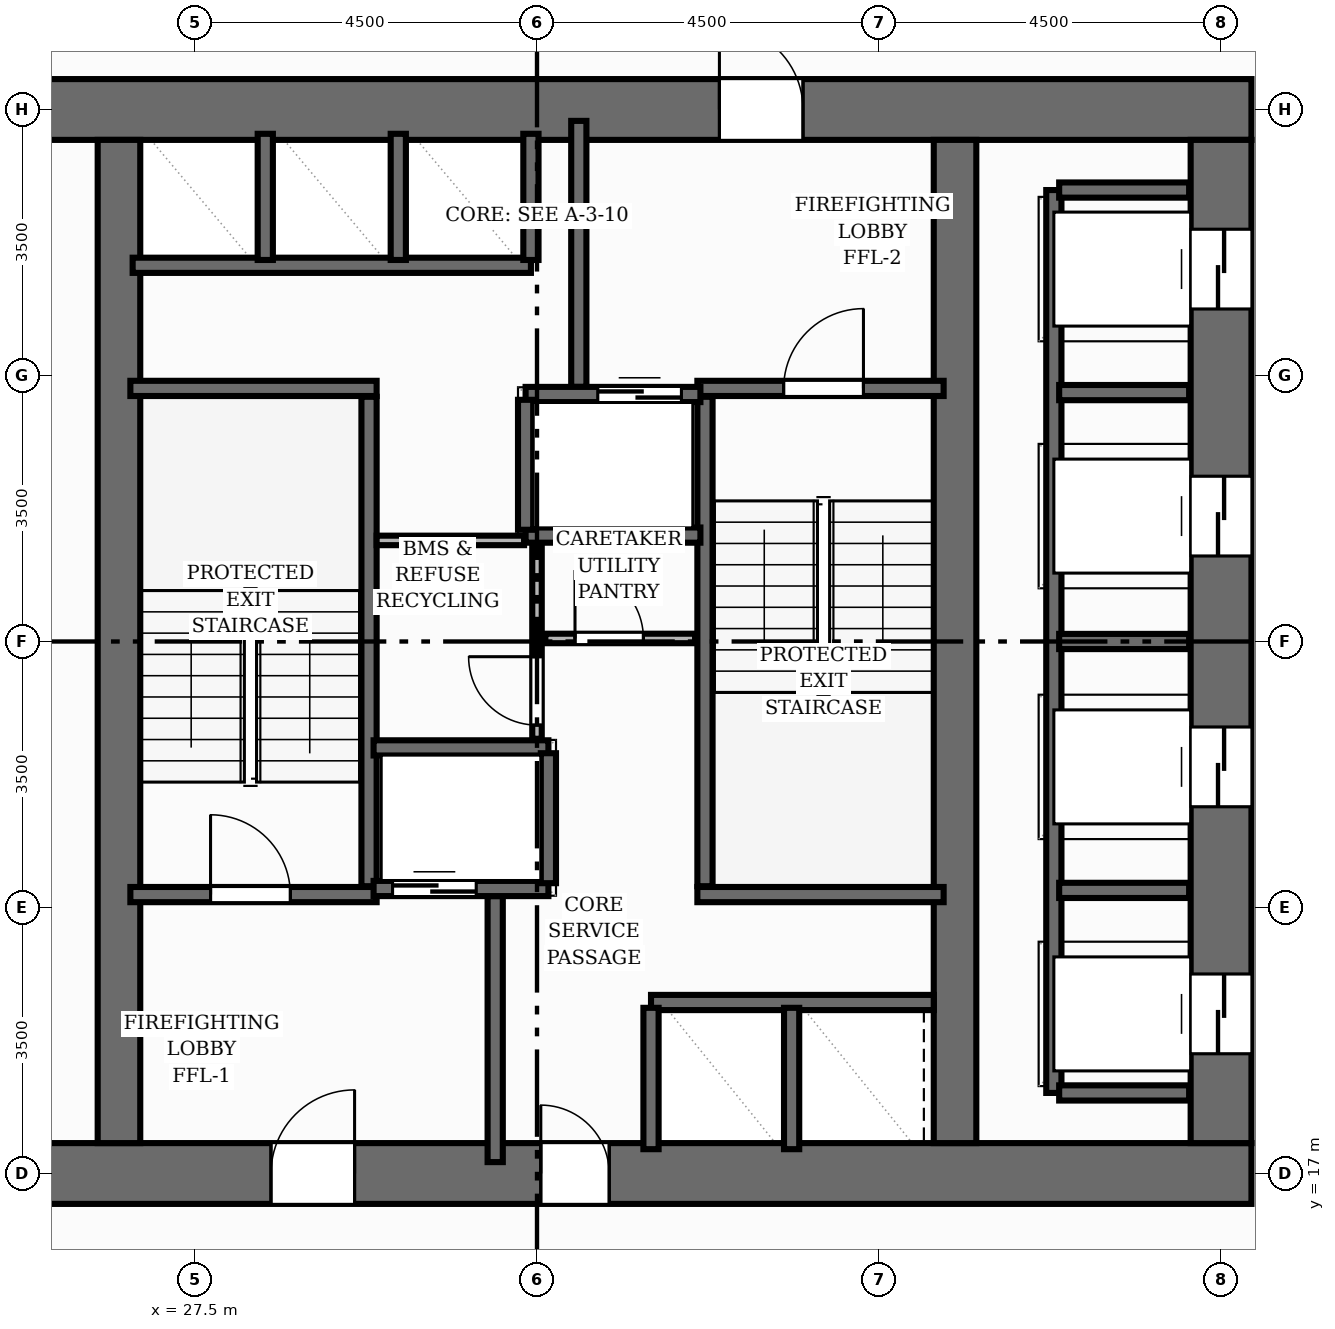
"""IFC4 building model, lengths in metres.
Left out: names, types, materials, properties, quantities, classifications, styles, units other than length and angle.
Written with IfcOpenShell. Run it as: python <this file> out.ifc"""

import sys

from ifc_helpers import new_model, si_unit, direction, frame, frame_2d, origin, place, context, subcontext, project, spatial, rectangle, extrude, element, fill, save


model = new_model("IFC4")
c1 = context("Model", 3, precision=1e-05, world=origin(), true_north=direction((0.0, 1.0)))
c2 = subcontext(c1, "Body", "Model", "MODEL_VIEW")
j1 = project(units=[si_unit("LENGTHUNIT", "METRE"), si_unit("PLANEANGLEUNIT", "RADIAN")], contexts=[c1])
p1 = place(None, origin())
s1 = spatial("IfcSite", under=j1, at=p1, CompositionType="ELEMENT")
p2 = place(p1, origin())
s2 = spatial("IfcBuilding", under=s1, at=p2, CompositionType="ELEMENT")
p3 = place(p2, frame((0.0, 0.0, 40.8)))
s3 = spatial("IfcBuildingStorey", under=s2, at=p3, CompositionType="ELEMENT", Elevation=40.8)
p4 = place(p3, frame((22.6, 17.0, 0.0), z_axis=(0.0, 0.0, 1.0), x_axis=(1.0, 0.0, 0.0)))
e1 = element("IfcWall", 1, at=p4, inside=s3, PredefinedType="SHEAR", context=c2, shape_type="SweptSolid", body=[
    extrude(rectangle(XDim=18.8, YDim=0.8, at=frame_2d((9.4, 0.0))), origin(), (0.0, 0.0, 1.0), 3.2),
])
p5 = place(p4, frame((5.9, 0.0, 0.0)))
e2 = element("IfcOpeningElement", 2, at=p5, cuts=e1, PredefinedType="OPENING", context=c2, shape_type="SweptSolid", body=[
    extrude(rectangle(XDim=1.1, YDim=2.15, at=frame_2d((0.55, 1.075))), frame((0.0, 0.41, 0.0), z_axis=(0.0, -1.0, 0.0), x_axis=(1.0, 0.0, 0.0)), (0.0, 0.0, 1.0), 0.82),
])
p6 = place(p4, frame((9.45, 0.0, 0.0)))
e3 = element("IfcOpeningElement", 3, at=p6, cuts=e1, PredefinedType="OPENING", context=c2, shape_type="SweptSolid", body=[
    extrude(rectangle(XDim=0.9, YDim=2.1, at=frame_2d((0.45, 1.05))), frame((0.0, 0.41, 0.0), z_axis=(0.0, -1.0, 0.0), x_axis=(1.0, 0.0, 0.0)), (0.0, 0.0, 1.0), 0.82),
])
p7 = place(p3, frame((22.6, 31.0, 0.0), z_axis=(0.0, 0.0, 1.0), x_axis=(1.0, 0.0, 0.0)))
e4 = element("IfcWall", 4, at=p7, inside=s3, PredefinedType="SHEAR", context=c2, shape_type="SweptSolid", body=[
    extrude(rectangle(XDim=18.8, YDim=0.8, at=frame_2d((9.4, 0.0))), origin(), (0.0, 0.0, 1.0), 3.2),
])
p8 = place(p7, frame((11.8, 0.0, 0.0)))
e5 = element("IfcOpeningElement", 5, at=p8, cuts=e4, PredefinedType="OPENING", context=c2, shape_type="SweptSolid", body=[
    extrude(rectangle(XDim=1.1, YDim=2.15, at=frame_2d((0.55, 1.075))), frame((0.0, 0.41, 0.0), z_axis=(0.0, -1.0, 0.0), x_axis=(1.0, 0.0, 0.0)), (0.0, 0.0, 1.0), 0.82),
])
p9 = place(p3, frame((41.0, 17.4, 0.0), z_axis=(0.0, 0.0, 1.0), x_axis=(0.0, 1.0, 0.0)))
e6 = element("IfcWall", 6, at=p9, inside=s3, PredefinedType="SHEAR", context=c2, shape_type="SweptSolid", body=[
    extrude(rectangle(XDim=13.2, YDim=0.8, at=frame_2d((6.6, 0.0))), origin(), (0.0, 0.0, 1.0), 3.2),
])
p10 = place(p9, frame((1.175, 0.0, 0.0)))
e7 = element("IfcOpeningElement", 7, at=p10, cuts=e6, PredefinedType="OPENING", context=c2, shape_type="SweptSolid", body=[
    extrude(rectangle(XDim=1.05, YDim=2.15, at=frame_2d((0.525, 1.075))), frame((0.0, 0.41, 0.0), z_axis=(0.0, -1.0, 0.0), x_axis=(1.0, 0.0, 0.0)), (0.0, 0.0, 1.0), 0.82),
])
p11 = place(p9, frame((4.425, 0.0, 0.0)))
e8 = element("IfcOpeningElement", 8, at=p11, cuts=e6, PredefinedType="OPENING", context=c2, shape_type="SweptSolid", body=[
    extrude(rectangle(XDim=1.05, YDim=2.15, at=frame_2d((0.525, 1.075))), frame((0.0, 0.41, 0.0), z_axis=(0.0, -1.0, 0.0), x_axis=(1.0, 0.0, 0.0)), (0.0, 0.0, 1.0), 0.82),
])
p12 = place(p9, frame((7.725, 0.0, 0.0)))
e9 = element("IfcOpeningElement", 9, at=p12, cuts=e6, PredefinedType="OPENING", context=c2, shape_type="SweptSolid", body=[
    extrude(rectangle(XDim=1.05, YDim=2.15, at=frame_2d((0.525, 1.075))), frame((0.0, 0.41, 0.0), z_axis=(0.0, -1.0, 0.0), x_axis=(1.0, 0.0, 0.0)), (0.0, 0.0, 1.0), 0.82),
])
p13 = place(p9, frame((10.975, 0.0, 0.0)))
e10 = element("IfcOpeningElement", 10, at=p13, cuts=e6, PredefinedType="OPENING", context=c2, shape_type="SweptSolid", body=[
    extrude(rectangle(XDim=1.05, YDim=2.15, at=frame_2d((0.525, 1.075))), frame((0.0, 0.41, 0.0), z_axis=(0.0, -1.0, 0.0), x_axis=(1.0, 0.0, 0.0)), (0.0, 0.0, 1.0), 0.82),
])
for number, where, z_axis, x_axis in (
    (11, (26.5, 17.4, 0.0), (0.0, 0.0, 1.0), (0.0, 1.0, 0.0)),
    (12, (37.5, 17.4, 0.0), (0.0, 0.0, 1.0), (0.0, 1.0, 0.0)),
):
    element("IfcWall", number, at=place(p3, frame(where, z_axis=z_axis, x_axis=x_axis)), inside=s3, PredefinedType="SHEAR", context=c2, shape_type="SweptSolid", body=[
        extrude(rectangle(XDim=13.2, YDim=0.56, at=frame_2d((6.6, 0.0))), origin(), (0.0, 0.0, 1.0), 3.2),
    ])
p14 = place(p3, frame((29.79, 20.78, 0.0), z_axis=(0.0, 0.0, 1.0), x_axis=(0.0, 1.0, 0.0)))
e13 = element("IfcWall", 13, at=p14, inside=s3, PredefinedType="SHEAR", context=c2, shape_type="SweptSolid", body=[
    extrude(rectangle(XDim=6.44, YDim=0.2, at=frame_2d((3.22, 0.0))), origin(), (0.0, 0.0, 1.0), 3.2),
])
p15 = place(p3, frame((26.65, 27.33, 0.0), z_axis=(0.0, 0.0, 1.0), x_axis=(1.0, 0.0, 0.0)))
e14 = element("IfcWall", 14, at=p15, inside=s3, PredefinedType="SHEAR", context=c2, shape_type="SweptSolid", body=[
    extrude(rectangle(XDim=3.24, YDim=0.2, at=frame_2d((1.62, 0.0))), origin(), (0.0, 0.0, 1.0), 3.2),
])
p16 = place(p3, frame((26.65, 20.67, 0.0), z_axis=(0.0, 0.0, 1.0), x_axis=(1.0, 0.0, 0.0)))
e15 = element("IfcWall", 15, at=p16, inside=s3, PredefinedType="SHEAR", context=c2, shape_type="SweptSolid", body=[
    extrude(rectangle(XDim=3.24, YDim=0.2, at=frame_2d((1.62, 0.0))), origin(), (0.0, 0.0, 1.0), 3.2),
])
p17 = place(p16, frame((1.055, 0.0, 0.0)))
e16 = element("IfcOpeningElement", 16, at=p17, cuts=e15, PredefinedType="OPENING", context=c2, shape_type="SweptSolid", body=[
    extrude(rectangle(XDim=1.05, YDim=2.15, at=frame_2d((0.525, 1.075))), frame((0.0, 0.11, 0.0), z_axis=(0.0, -1.0, 0.0), x_axis=(1.0, 0.0, 0.0)), (0.0, 0.0, 1.0), 0.22),
])
p18 = place(p3, frame((34.21, 20.78, 0.0), z_axis=(0.0, 0.0, 1.0), x_axis=(0.0, 1.0, 0.0)))
e17 = element("IfcWall", 17, at=p18, inside=s3, PredefinedType="SHEAR", context=c2, shape_type="SweptSolid", body=[
    extrude(rectangle(XDim=6.44, YDim=0.2, at=frame_2d((3.22, 0.0))), origin(), (0.0, 0.0, 1.0), 3.2),
])
p19 = place(p3, frame((34.11, 20.67, 0.0), z_axis=(0.0, 0.0, 1.0), x_axis=(1.0, 0.0, 0.0)))
e18 = element("IfcWall", 18, at=p19, inside=s3, PredefinedType="SHEAR", context=c2, shape_type="SweptSolid", body=[
    extrude(rectangle(XDim=3.24, YDim=0.2, at=frame_2d((1.62, 0.0))), origin(), (0.0, 0.0, 1.0), 3.2),
])
p20 = place(p3, frame((34.11, 27.33, 0.0), z_axis=(0.0, 0.0, 1.0), x_axis=(1.0, 0.0, 0.0)))
e19 = element("IfcWall", 19, at=p20, inside=s3, PredefinedType="SHEAR", context=c2, shape_type="SweptSolid", body=[
    extrude(rectangle(XDim=3.24, YDim=0.2, at=frame_2d((1.62, 0.0))), origin(), (0.0, 0.0, 1.0), 3.2),
])
p21 = place(p20, frame((1.135, 0.0, 0.0)))
e20 = element("IfcOpeningElement", 20, at=p21, cuts=e19, PredefinedType="OPENING", context=c2, shape_type="SweptSolid", body=[
    extrude(rectangle(XDim=1.05, YDim=2.15, at=frame_2d((0.525, 1.075))), frame((0.0, 0.11, 0.0), z_axis=(0.0, -1.0, 0.0), x_axis=(1.0, 0.0, 0.0)), (0.0, 0.0, 1.0), 0.22),
])
for number, where, z_axis, x_axis in (
    (21, (31.45, 17.15, 0.0), (0.0, 0.0, 1.0), (0.0, 1.0, 0.0)),
    (22, (32.55, 27.35, 0.0), (0.0, 0.0, 1.0), (0.0, 1.0, 0.0)),
):
    element("IfcWall", number, at=place(p3, frame(where, z_axis=z_axis, x_axis=x_axis)), inside=s3, PredefinedType="SHEAR", context=c2, shape_type="SweptSolid", body=[
        extrude(rectangle(XDim=3.5, YDim=0.2, at=frame_2d((1.75, 0.0))), origin(), (0.0, 0.0, 1.0), 3.2),
    ])
p22 = place(p3, frame((29.85, 20.75, 0.0), z_axis=(0.0, 0.0, 1.0), x_axis=(1.0, 0.0, 0.0)))
e23 = element("IfcWall", 23, at=p22, inside=s3, PredefinedType="SHEAR", context=c2, shape_type="SweptSolid", body=[
    extrude(rectangle(XDim=2.3, YDim=0.2, at=frame_2d((1.15, 0.0))), origin(), (0.0, 0.0, 1.0), 3.2),
])
p23 = place(p22, frame((0.25, 0.0, 0.0)))
e24 = element("IfcOpeningElement", 24, at=p23, cuts=e23, PredefinedType="OPENING", context=c2, shape_type="SweptSolid", body=[
    extrude(rectangle(XDim=1.1, YDim=2.15, at=frame_2d((0.55, 1.075))), frame((0.0, 0.11, 0.0), z_axis=(0.0, -1.0, 0.0), x_axis=(1.0, 0.0, 0.0)), (0.0, 0.0, 1.0), 0.22),
])
p24 = place(p3, frame((29.85, 22.6, 0.0), z_axis=(0.0, 0.0, 1.0), x_axis=(1.0, 0.0, 0.0)))
e25 = element("IfcWall", 25, at=p24, inside=s3, PredefinedType="SHEAR", context=c2, shape_type="SweptSolid", body=[
    extrude(rectangle(XDim=2.3, YDim=0.2, at=frame_2d((1.15, 0.0))), origin(), (0.0, 0.0, 1.0), 3.2),
])
p25 = place(p3, frame((32.15, 20.82, 0.0), z_axis=(0.0, 0.0, 1.0), x_axis=(0.0, 1.0, 0.0)))
e26 = element("IfcWall", 26, at=p25, inside=s3, PredefinedType="SHEAR", context=c2, shape_type="SweptSolid", body=[
    extrude(rectangle(XDim=1.71, YDim=0.2, at=frame_2d((0.855, 0.0))), origin(), (0.0, 0.0, 1.0), 3.2),
])
p26 = place(p3, frame((31.85, 27.25, 0.0), z_axis=(0.0, 0.0, 1.0), x_axis=(1.0, 0.0, 0.0)))
e27 = element("IfcWall", 27, at=p26, inside=s3, PredefinedType="SHEAR", context=c2, shape_type="SweptSolid", body=[
    extrude(rectangle(XDim=2.3, YDim=0.2, at=frame_2d((1.15, 0.0))), origin(), (0.0, 0.0, 1.0), 3.2),
])
p27 = place(p26, frame((0.95, 0.0, 0.0)))
e28 = element("IfcOpeningElement", 28, at=p27, cuts=e27, PredefinedType="OPENING", context=c2, shape_type="SweptSolid", body=[
    extrude(rectangle(XDim=1.1, YDim=2.15, at=frame_2d((0.55, 1.075))), frame((0.0, 0.11, 0.0), z_axis=(0.0, -1.0, 0.0), x_axis=(1.0, 0.0, 0.0)), (0.0, 0.0, 1.0), 0.22),
])
p28 = place(p3, frame((31.85, 25.4, 0.0), z_axis=(0.0, 0.0, 1.0), x_axis=(1.0, 0.0, 0.0)))
e29 = element("IfcWall", 29, at=p28, inside=s3, PredefinedType="SHEAR", context=c2, shape_type="SweptSolid", body=[
    extrude(rectangle(XDim=2.3, YDim=0.2, at=frame_2d((1.15, 0.0))), origin(), (0.0, 0.0, 1.0), 3.2),
])
p29 = place(p3, frame((31.85, 25.47, 0.0), z_axis=(0.0, 0.0, 1.0), x_axis=(0.0, 1.0, 0.0)))
e30 = element("IfcWall", 30, at=p29, inside=s3, PredefinedType="SHEAR", context=c2, shape_type="SweptSolid", body=[
    extrude(rectangle(XDim=1.71, YDim=0.2, at=frame_2d((0.855, 0.0))), origin(), (0.0, 0.0, 1.0), 3.2),
])
p30 = place(p3, frame((38.8, 18.06, 0.0), z_axis=(0.0, 0.0, 1.0), x_axis=(0.0, 1.0, 0.0)))
e31 = element("IfcWall", 31, at=p30, inside=s3, PredefinedType="SHEAR", context=c2, shape_type="SweptSolid", body=[
    extrude(rectangle(XDim=11.88, YDim=0.2, at=frame_2d((5.94, 0.0))), origin(), (0.0, 0.0, 1.0), 3.2),
])
for number, where, z_axis, x_axis in (
    (32, (38.87, 18.06, 0.0), (0.0, 0.0, 1.0), (1.0, 0.0, 0.0)),
    (33, (38.87, 29.94, 0.0), (0.0, 0.0, 1.0), (1.0, 0.0, 0.0)),
    (34, (38.87, 20.725, 0.0), (0.0, 0.0, 1.0), (1.0, 0.0, 0.0)),
    (35, (38.87, 24.0, 0.0), (0.0, 0.0, 1.0), (1.0, 0.0, 0.0)),
    (36, (38.87, 27.275, 0.0), (0.0, 0.0, 1.0), (1.0, 0.0, 0.0)),
):
    element("IfcWall", number, at=place(p3, frame(where, z_axis=z_axis, x_axis=x_axis)), inside=s3, PredefinedType="SHEAR", context=c2, shape_type="SweptSolid", body=[
        extrude(rectangle(XDim=1.71, YDim=0.2, at=frame_2d((0.855, 0.0))), origin(), (0.0, 0.0, 1.0), 3.2),
    ])
p31 = place(p3, frame((26.68, 28.95, 0.0), z_axis=(0.0, 0.0, 1.0), x_axis=(1.0, 0.0, 0.0)))
e37 = element("IfcWall", 37, at=p31, inside=s3, PredefinedType="SHEAR", context=c2, shape_type="SweptSolid", body=[
    extrude(rectangle(XDim=5.24, YDim=0.2, at=frame_2d((2.62, 0.0))), origin(), (0.0, 0.0, 1.0), 3.2),
])
for number, where, z_axis, x_axis in (
    (38, (31.92, 29.02, 0.0), (0.0, 0.0, 1.0), (0.0, 1.0, 0.0)),
    (39, (28.425, 29.02, 0.0), (0.0, 0.0, 1.0), (0.0, 1.0, 0.0)),
    (40, (30.175, 29.02, 0.0), (0.0, 0.0, 1.0), (0.0, 1.0, 0.0)),
):
    element("IfcWall", number, at=place(p3, frame(where, z_axis=z_axis, x_axis=x_axis)), inside=s3, PredefinedType="SHEAR", context=c2, shape_type="SweptSolid", body=[
        extrude(rectangle(XDim=1.66, YDim=0.2, at=frame_2d((0.83, 0.0))), origin(), (0.0, 0.0, 1.0), 3.2),
    ])
p32 = place(p3, frame((33.5, 19.25, 0.0), z_axis=(0.0, 0.0, 1.0), x_axis=(1.0, 0.0, 0.0)))
e41 = element("IfcWall", 41, at=p32, inside=s3, PredefinedType="SHEAR", context=c2, shape_type="SweptSolid", body=[
    extrude(rectangle(XDim=3.72, YDim=0.2, at=frame_2d((1.86, 0.0))), origin(), (0.0, 0.0, 1.0), 3.2),
])
for number, where, z_axis, x_axis in (
    (42, (33.5, 17.32, 0.0), (0.0, 0.0, 1.0), (0.0, 1.0, 0.0)),
    (43, (35.35, 17.32, 0.0), (0.0, 0.0, 1.0), (0.0, 1.0, 0.0)),
):
    element("IfcWall", number, at=place(p3, frame(where, z_axis=z_axis, x_axis=x_axis)), inside=s3, PredefinedType="SHEAR", context=c2, shape_type="SweptSolid", body=[
        extrude(rectangle(XDim=1.86, YDim=0.2, at=frame_2d((0.93, 0.0))), origin(), (0.0, 0.0, 1.0), 3.2),
    ])
p33 = place(p3, frame((32.0, 22.72, 0.0), z_axis=(0.0, 0.0, 1.0), x_axis=(0.0, 1.0, 0.0)))
e44 = element("IfcWall", 44, at=p33, inside=s3, PredefinedType="PARTITIONING", context=c2, shape_type="SweptSolid", body=[
    extrude(rectangle(XDim=2.52, YDim=0.125, at=frame_2d((1.26, 0.0))), origin(), (0.0, 0.0, 1.0), 2.955),
])
p34 = place(p33, frame((0.18, 0.0, 0.0)))
e45 = element("IfcOpeningElement", 45, at=p34, cuts=e44, PredefinedType="OPENING", context=c2, shape_type="SweptSolid", body=[
    extrude(rectangle(XDim=0.9, YDim=2.1, at=frame_2d((0.45, 1.05))), frame((0.0, 0.073, 0.0), z_axis=(0.0, -1.0, 0.0), x_axis=(1.0, 0.0, 0.0)), (0.0, 0.0, 1.0), 0.145),
])
p35 = place(p3, frame((32.11, 24.04, 0.0), z_axis=(0.0, 0.0, 1.0), x_axis=(1.0, 0.0, 0.0)))
e46 = element("IfcWall", 46, at=p35, inside=s3, PredefinedType="PARTITIONING", context=c2, shape_type="SweptSolid", body=[
    extrude(rectangle(XDim=1.97, YDim=0.125, at=frame_2d((0.985, 0.0))), origin(), (0.0, 0.0, 1.0), 2.955),
])
p36 = place(p35, frame((0.39, 0.0, 0.0)))
e47 = element("IfcOpeningElement", 47, at=p36, cuts=e46, PredefinedType="OPENING", context=c2, shape_type="SweptSolid", body=[
    extrude(rectangle(XDim=0.9, YDim=2.1, at=frame_2d((0.45, 1.05))), frame((0.0, 0.073, 0.0), z_axis=(0.0, -1.0, 0.0), x_axis=(1.0, 0.0, 0.0)), (0.0, 0.0, 1.0), 0.145),
])
p37 = place(p3, frame((29.89, 25.33, 0.0), z_axis=(0.0, 0.0, 1.0), x_axis=(1.0, 0.0, 0.0)))
e48 = element("IfcWall", 48, at=p37, inside=s3, PredefinedType="PARTITIONING", context=c2, shape_type="SweptSolid", body=[
    extrude(rectangle(XDim=1.94, YDim=0.125, at=frame_2d((0.97, 0.0))), origin(), (0.0, 0.0, 1.0), 2.955),
])
p38 = place(p17, origin())
e49 = element("IfcDoor", 49, at=p38, inside=s3, OperationType="SINGLE_SWING_LEFT", PredefinedType="DOOR", context=c2, shape_type="SweptSolid", body=[
    extrude(rectangle(XDim=1.05, YDim=2.15, at=frame_2d((0.525, 1.075))), frame((0.0, 0.025, 0.0), z_axis=(0.0, -1.0, 0.0), x_axis=(1.0, 0.0, 0.0)), (0.0, 0.0, 1.0), 0.05),
])
fill(e16, e49)
p39 = place(p21, origin())
e50 = element("IfcDoor", 50, at=p39, inside=s3, OperationType="SINGLE_SWING_RIGHT", PredefinedType="DOOR", context=c2, shape_type="SweptSolid", body=[
    extrude(rectangle(XDim=1.05, YDim=2.15, at=frame_2d((0.525, 1.075))), frame((0.0, 0.025, 0.0), z_axis=(0.0, -1.0, 0.0), x_axis=(1.0, 0.0, 0.0)), (0.0, 0.0, 1.0), 0.05),
])
fill(e20, e50)
p40 = place(p5, origin())
e51 = element("IfcDoor", 51, at=p40, inside=s3, OperationType="SINGLE_SWING_RIGHT", PredefinedType="DOOR", context=c2, shape_type="SweptSolid", body=[
    extrude(rectangle(XDim=1.1, YDim=2.15, at=frame_2d((0.55, 1.075))), frame((0.0, 0.025, 0.0), z_axis=(0.0, -1.0, 0.0), x_axis=(1.0, 0.0, 0.0)), (0.0, 0.0, 1.0), 0.05),
])
fill(e2, e51)
p41 = place(p8, origin())
e52 = element("IfcDoor", 52, at=p41, inside=s3, OperationType="SINGLE_SWING_LEFT", PredefinedType="DOOR", context=c2, shape_type="SweptSolid", body=[
    extrude(rectangle(XDim=1.1, YDim=2.15, at=frame_2d((0.55, 1.075))), frame((0.0, 0.025, 0.0), z_axis=(0.0, -1.0, 0.0), x_axis=(1.0, 0.0, 0.0)), (0.0, 0.0, 1.0), 0.05),
])
fill(e5, e52)
p42 = place(p23, origin())
e53 = element("IfcDoor", 53, at=p42, inside=s3, OperationType="DOUBLE_DOOR_SLIDING", PredefinedType="DOOR", context=c2, shape_type="SweptSolid", body=[
    extrude(rectangle(XDim=1.1, YDim=2.15, at=frame_2d((0.55, 1.075))), frame((0.0, 0.025, 0.0), z_axis=(0.0, -1.0, 0.0), x_axis=(1.0, 0.0, 0.0)), (0.0, 0.0, 1.0), 0.05),
])
fill(e24, e53)
p43 = place(p27, origin())
e54 = element("IfcDoor", 54, at=p43, inside=s3, OperationType="DOUBLE_DOOR_SLIDING", PredefinedType="DOOR", context=c2, shape_type="SweptSolid", body=[
    extrude(rectangle(XDim=1.1, YDim=2.15, at=frame_2d((0.55, 1.075))), frame((0.0, 0.025, 0.0), z_axis=(0.0, -1.0, 0.0), x_axis=(1.0, 0.0, 0.0)), (0.0, 0.0, 1.0), 0.05),
])
fill(e28, e54)
p44 = place(p10, origin())
e55 = element("IfcDoor", 55, at=p44, inside=s3, OperationType="DOUBLE_DOOR_SLIDING", PredefinedType="DOOR", context=c2, shape_type="SweptSolid", body=[
    extrude(rectangle(XDim=1.05, YDim=2.15, at=frame_2d((0.525, 1.075))), frame((0.0, 0.025, 0.0), z_axis=(0.0, -1.0, 0.0), x_axis=(1.0, 0.0, 0.0)), (0.0, 0.0, 1.0), 0.05),
])
fill(e7, e55)
p45 = place(p11, origin())
e56 = element("IfcDoor", 56, at=p45, inside=s3, OperationType="DOUBLE_DOOR_SLIDING", PredefinedType="DOOR", context=c2, shape_type="SweptSolid", body=[
    extrude(rectangle(XDim=1.05, YDim=2.15, at=frame_2d((0.525, 1.075))), frame((0.0, 0.025, 0.0), z_axis=(0.0, -1.0, 0.0), x_axis=(1.0, 0.0, 0.0)), (0.0, 0.0, 1.0), 0.05),
])
fill(e8, e56)
p46 = place(p12, origin())
e57 = element("IfcDoor", 57, at=p46, inside=s3, OperationType="DOUBLE_DOOR_SLIDING", PredefinedType="DOOR", context=c2, shape_type="SweptSolid", body=[
    extrude(rectangle(XDim=1.05, YDim=2.15, at=frame_2d((0.525, 1.075))), frame((0.0, 0.025, 0.0), z_axis=(0.0, -1.0, 0.0), x_axis=(1.0, 0.0, 0.0)), (0.0, 0.0, 1.0), 0.05),
])
fill(e9, e57)
p47 = place(p13, origin())
e58 = element("IfcDoor", 58, at=p47, inside=s3, OperationType="DOUBLE_DOOR_SLIDING", PredefinedType="DOOR", context=c2, shape_type="SweptSolid", body=[
    extrude(rectangle(XDim=1.05, YDim=2.15, at=frame_2d((0.525, 1.075))), frame((0.0, 0.025, 0.0), z_axis=(0.0, -1.0, 0.0), x_axis=(1.0, 0.0, 0.0)), (0.0, 0.0, 1.0), 0.05),
])
fill(e10, e58)
p48 = place(p6, origin())
e59 = element("IfcDoor", 59, at=p48, inside=s3, OperationType="SINGLE_SWING_LEFT", PredefinedType="DOOR", context=c2, shape_type="SweptSolid", body=[
    extrude(rectangle(XDim=0.9, YDim=2.1, at=frame_2d((0.45, 1.05))), frame((0.0, 0.025, 0.0), z_axis=(0.0, -1.0, 0.0), x_axis=(1.0, 0.0, 0.0)), (0.0, 0.0, 1.0), 0.05),
])
fill(e3, e59)
p49 = place(p36, origin())
e60 = element("IfcDoor", 60, at=p49, inside=s3, OperationType="SINGLE_SWING_LEFT", PredefinedType="DOOR", context=c2, shape_type="SweptSolid", body=[
    extrude(rectangle(XDim=0.9, YDim=2.1, at=frame_2d((0.45, 1.05))), frame((0.0, 0.025, 0.0), z_axis=(0.0, -1.0, 0.0), x_axis=(1.0, 0.0, 0.0)), (0.0, 0.0, 1.0), 0.05),
])
fill(e47, e60)
p50 = place(p34, origin())
e61 = element("IfcDoor", 61, at=p50, inside=s3, OperationType="SINGLE_SWING_RIGHT", PredefinedType="DOOR", context=c2, shape_type="SweptSolid", body=[
    extrude(rectangle(XDim=0.9, YDim=2.1, at=frame_2d((0.45, 1.05))), frame((0.0, 0.025, 0.0), z_axis=(0.0, -1.0, 0.0), x_axis=(1.0, 0.0, 0.0)), (0.0, 0.0, 1.0), 0.05),
])
fill(e45, e61)
save(model, sys.argv[1])
